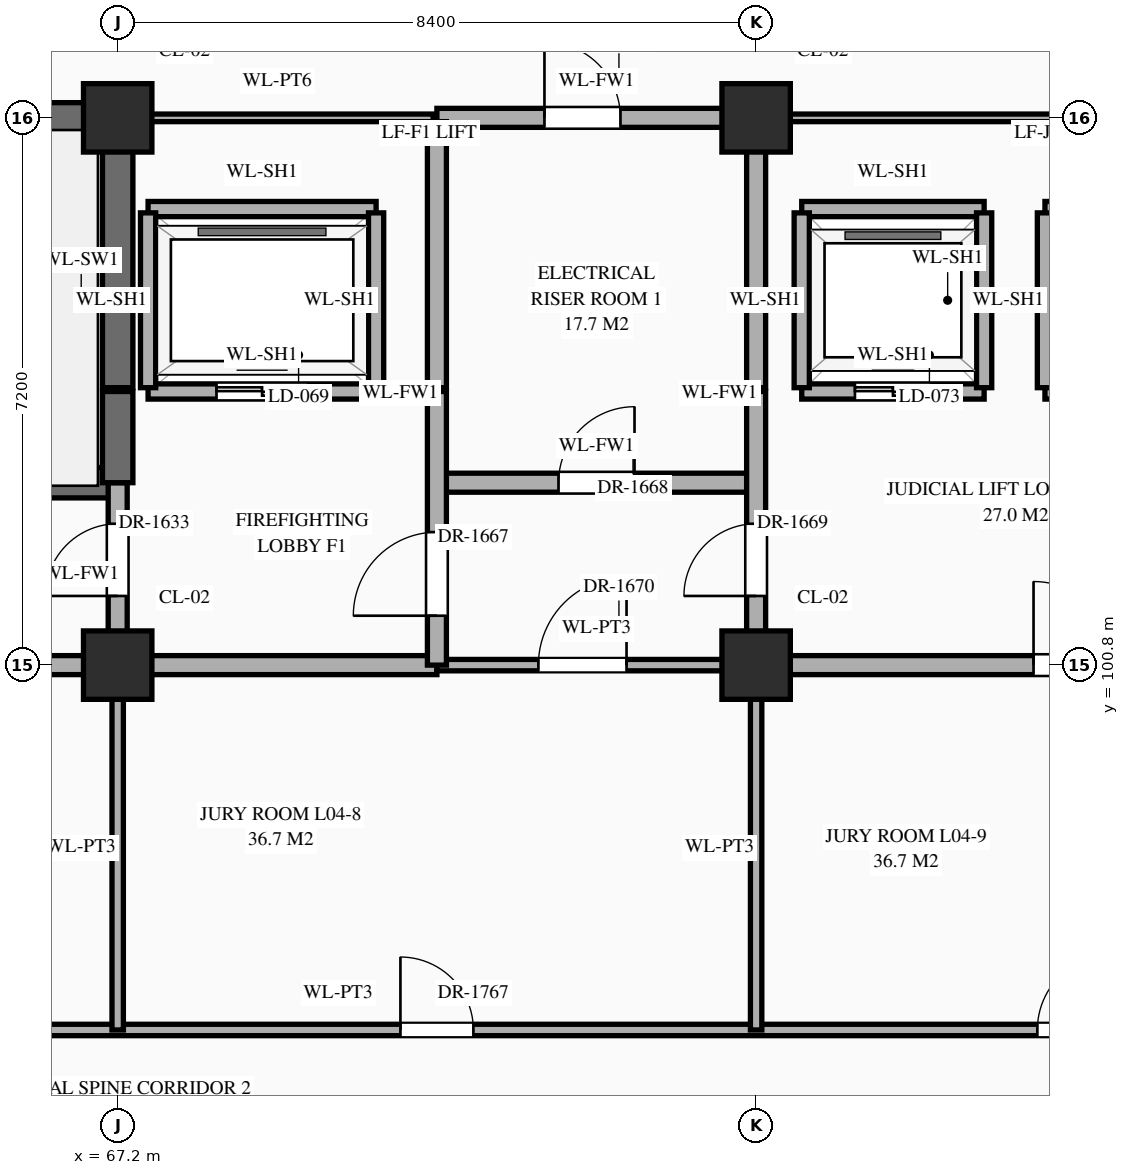
"""IFC4 building model, lengths in metres.
Left out: names, types, materials, properties, quantities, classifications, styles, units other than length and angle.
Written with IfcOpenShell. Run it as: python <this file> out.ifc"""

import sys

from ifc_helpers import new_model, si_unit, direction, frame, frame_2d, origin, origin_2d, place, context, subcontext, project, spatial, rectangle, extrude, element, fill, save


model = new_model("IFC4")
c1 = context("Model", 3, precision=1e-05, world=origin(), true_north=direction((0.0, 1.0)))
c2 = subcontext(c1, "Body", "Model", "MODEL_VIEW")
j1 = project(units=[si_unit("LENGTHUNIT", "METRE"), si_unit("PLANEANGLEUNIT", "RADIAN")], contexts=[c1])
p1 = place(None, origin())
s1 = spatial("IfcSite", under=j1, at=p1, CompositionType="ELEMENT")
p2 = place(p1, origin())
s2 = spatial("IfcBuilding", under=s1, at=p2, CompositionType="ELEMENT")
p3 = place(p2, frame((0.0, 0.0, 16.2)))
s3 = spatial("IfcBuildingStorey", under=s2, at=p3, CompositionType="ELEMENT", Elevation=16.2)
for number, where, z_axis, x_axis in (
    (1, (67.2, 100.8, 0.0), (0.0, 0.0, 1.0), (1.0, 0.0, 0.0)),
    (2, (67.2, 108.0, 0.0), (0.0, 0.0, 1.0), (1.0, 0.0, 0.0)),
    (3, (75.6, 100.8, 0.0), (0.0, 0.0, 1.0), (1.0, 0.0, 0.0)),
    (4, (75.6, 108.0, 0.0), (0.0, 0.0, 1.0), (1.0, 0.0, 0.0)),
):
    element("IfcColumn", number, at=place(p3, frame(where, z_axis=z_axis, x_axis=x_axis)), inside=s3, PredefinedType="COLUMN", context=c2, shape_type="SweptSolid", body=[
        extrude(rectangle(XDim=0.9, YDim=0.9, at=origin_2d()), origin(), (0.0, 0.0, 1.0), 5.4),
    ])
p4 = place(p3, frame((56.2, 96.0, 0.0), z_axis=(0.0, 0.0, 1.0), x_axis=(1.0, 0.0, 0.0)))
e5 = element("IfcWall", 5, at=p4, inside=s3, PredefinedType="STANDARD", context=c2, shape_type="SweptSolid", body=[
    extrude(rectangle(XDim=27.8, YDim=0.15, at=frame_2d((13.9, 0.0))), origin(), (0.0, 0.0, 1.0), 5.12),
])
p5 = place(p4, frame((0.87, 0.0, 0.0)))
e6 = element("IfcOpeningElement", 6, at=p5, cuts=e5, PredefinedType="OPENING", context=c2, shape_type="SweptSolid", body=[
    extrude(rectangle(XDim=0.86, YDim=2.1, at=frame_2d((0.43, 1.05))), frame((0.0, 0.087, 0.0), z_axis=(0.0, -1.0, 0.0), x_axis=(1.0, 0.0, 0.0)), (0.0, 0.0, 1.0), 0.174),
])
p6 = place(p4, frame((6.34, 0.0, 0.0)))
e7 = element("IfcOpeningElement", 7, at=p6, cuts=e5, PredefinedType="OPENING", context=c2, shape_type="SweptSolid", body=[
    extrude(rectangle(XDim=0.92, YDim=2.15, at=frame_2d((0.46, 1.075))), frame((0.0, 0.087, 0.0), z_axis=(0.0, -1.0, 0.0), x_axis=(1.0, 0.0, 0.0)), (0.0, 0.0, 1.0), 0.174),
])
p7 = place(p4, frame((14.72, 0.0, 0.0)))
e8 = element("IfcOpeningElement", 8, at=p7, cuts=e5, PredefinedType="OPENING", context=c2, shape_type="SweptSolid", body=[
    extrude(rectangle(XDim=0.96, YDim=2.2, at=frame_2d((0.48, 1.1))), frame((0.0, 0.087, 0.0), z_axis=(0.0, -1.0, 0.0), x_axis=(1.0, 0.0, 0.0)), (0.0, 0.0, 1.0), 0.174),
])
p8 = place(p4, frame((23.1, 0.0, 0.0)))
e9 = element("IfcOpeningElement", 9, at=p8, cuts=e5, PredefinedType="OPENING", context=c2, shape_type="SweptSolid", body=[
    extrude(rectangle(XDim=1.0, YDim=2.25, at=frame_2d((0.5, 1.125))), frame((0.0, 0.087, 0.0), z_axis=(0.0, -1.0, 0.0), x_axis=(1.0, 0.0, 0.0)), (0.0, 0.0, 1.0), 0.174),
])
p9 = place(p3, frame((58.8, 100.8, 0.0), z_axis=(0.0, 0.0, 1.0), x_axis=(1.0, 0.0, 0.0)))
e10 = element("IfcWall", 10, at=p9, inside=s3, PredefinedType="STANDARD", context=c2, shape_type="SweptSolid", body=[
    extrude(rectangle(XDim=12.6, YDim=0.25, at=frame_2d((6.3, 0.0))), origin(), (0.0, 0.0, 1.0), 4.27),
])
p10 = place(p9, frame((3.7, 0.0, 0.0)))
e11 = element("IfcOpeningElement", 11, at=p10, cuts=e10, PredefinedType="OPENING", context=c2, shape_type="SweptSolid", body=[
    extrude(rectangle(XDim=1.0, YDim=2.2, at=frame_2d((0.5, 1.1))), frame((0.0, 0.137, 0.0), z_axis=(0.0, -1.0, 0.0), x_axis=(1.0, 0.0, 0.0)), (0.0, 0.0, 1.0), 0.274),
])
p11 = place(p3, frame((71.4, 100.8, 0.0), z_axis=(0.0, 0.0, 1.0), x_axis=(1.0, 0.0, 0.0)))
e12 = element("IfcWall", 12, at=p11, inside=s3, PredefinedType="STANDARD", context=c2, shape_type="SweptSolid", body=[
    extrude(rectangle(XDim=4.2, YDim=0.15, at=frame_2d((2.1, 0.0))), origin(), (0.0, 0.0, 1.0), 4.27),
])
p12 = place(p11, frame((1.335, 0.0, 0.0)))
e13 = element("IfcOpeningElement", 13, at=p12, cuts=e12, PredefinedType="OPENING", context=c2, shape_type="SweptSolid", body=[
    extrude(rectangle(XDim=1.16, YDim=2.3, at=frame_2d((0.58, 1.15))), frame((0.0, 0.087, 0.0), z_axis=(0.0, -1.0, 0.0), x_axis=(1.0, 0.0, 0.0)), (0.0, 0.0, 1.0), 0.174),
])
p13 = place(p3, frame((75.6, 100.8, 0.0), z_axis=(0.0, 0.0, 1.0), x_axis=(1.0, 0.0, 0.0)))
e14 = element("IfcWall", 14, at=p13, inside=s3, PredefinedType="STANDARD", context=c2, shape_type="SweptSolid", body=[
    extrude(rectangle(XDim=16.8, YDim=0.25, at=frame_2d((8.4, 0.0))), origin(), (0.0, 0.0, 1.0), 4.27),
])
p14 = place(p13, frame((3.65, 0.0, 0.0)))
e15 = element("IfcOpeningElement", 15, at=p14, cuts=e14, PredefinedType="OPENING", context=c2, shape_type="SweptSolid", body=[
    extrude(rectangle(XDim=1.1, YDim=2.2, at=frame_2d((0.55, 1.1))), frame((0.0, 0.137, 0.0), z_axis=(0.0, -1.0, 0.0), x_axis=(1.0, 0.0, 0.0)), (0.0, 0.0, 1.0), 0.274),
])
p15 = place(p13, frame((9.81, 0.0, 0.0)))
e16 = element("IfcOpeningElement", 16, at=p15, cuts=e14, PredefinedType="OPENING", context=c2, shape_type="SweptSolid", body=[
    extrude(rectangle(XDim=0.95, YDim=2.15, at=frame_2d((0.475, 1.075))), frame((0.0, 0.137, 0.0), z_axis=(0.0, -1.0, 0.0), x_axis=(1.0, 0.0, 0.0)), (0.0, 0.0, 1.0), 0.274),
])
p16 = place(p13, frame((12.45, 0.0, 0.0)))
e17 = element("IfcOpeningElement", 17, at=p16, cuts=e14, PredefinedType="OPENING", context=c2, shape_type="SweptSolid", body=[
    extrude(rectangle(XDim=1.1, YDim=2.2, at=frame_2d((0.55, 1.1))), frame((0.0, 0.137, 0.0), z_axis=(0.0, -1.0, 0.0), x_axis=(1.0, 0.0, 0.0)), (0.0, 0.0, 1.0), 0.274),
])
p17 = place(p13, frame((14.815, 0.0, 0.0)))
e18 = element("IfcOpeningElement", 18, at=p17, cuts=e14, PredefinedType="OPENING", context=c2, shape_type="SweptSolid", body=[
    extrude(rectangle(XDim=1.0, YDim=2.2, at=frame_2d((0.5, 1.1))), frame((0.0, 0.137, 0.0), z_axis=(0.0, -1.0, 0.0), x_axis=(1.0, 0.0, 0.0)), (0.0, 0.0, 1.0), 0.274),
])
p18 = place(p3, frame((58.8, 103.2, 0.0), z_axis=(0.0, 0.0, 1.0), x_axis=(1.0, 0.0, 0.0)))
e19 = element("IfcWall", 19, at=p18, inside=s3, PredefinedType="SHEAR", context=c2, shape_type="SweptSolid", body=[
    extrude(rectangle(XDim=8.4, YDim=0.4, at=frame_2d((4.2, 0.0))), origin(), (0.0, 0.0, 1.0), 5.12),
])
p19 = place(p18, frame((0.65, 0.0, 0.0)))
e20 = element("IfcOpeningElement", 20, at=p19, cuts=e19, PredefinedType="OPENING", context=c2, shape_type="SweptSolid", body=[
    extrude(rectangle(XDim=1.1, YDim=2.2, at=frame_2d((0.55, 1.1))), frame((0.0, 0.212, 0.0), z_axis=(0.0, -1.0, 0.0), x_axis=(1.0, 0.0, 0.0)), (0.0, 0.0, 1.0), 0.424),
])
p20 = place(p3, frame((71.4, 103.2, 0.0), z_axis=(0.0, 0.0, 1.0), x_axis=(1.0, 0.0, 0.0)))
e21 = element("IfcWall", 21, at=p20, inside=s3, PredefinedType="STANDARD", context=c2, shape_type="SweptSolid", body=[
    extrude(rectangle(XDim=4.2, YDim=0.25, at=frame_2d((2.1, 0.0))), origin(), (0.0, 0.0, 1.0), 5.12),
])
p21 = place(p20, frame((1.6, 0.0, 0.0)))
e22 = element("IfcOpeningElement", 22, at=p21, cuts=e21, PredefinedType="OPENING", context=c2, shape_type="SweptSolid", body=[
    extrude(rectangle(XDim=1.0, YDim=2.2, at=frame_2d((0.5, 1.1))), frame((0.0, 0.137, 0.0), z_axis=(0.0, -1.0, 0.0), x_axis=(1.0, 0.0, 0.0)), (0.0, 0.0, 1.0), 0.274),
])
p22 = place(p3, frame((67.6, 104.4, 0.0), z_axis=(0.0, 0.0, 1.0), x_axis=(1.0, 0.0, 0.0)))
e23 = element("IfcWall", 23, at=p22, inside=s3, PredefinedType="STANDARD", context=c2, shape_type="SweptSolid", body=[
    extrude(rectangle(XDim=3.0, YDim=0.2, at=frame_2d((1.5, 0.0))), origin(), (0.0, 0.0, 1.0), 5.12),
])
p23 = place(p22, frame((0.9, 0.0, 0.0)))
e24 = element("IfcOpeningElement", 24, at=p23, cuts=e23, PredefinedType="OPENING", context=c2, shape_type="SweptSolid", body=[
    extrude(rectangle(XDim=1.2, YDim=2.15, at=frame_2d((0.6, 1.075))), frame((0.0, 0.112, 0.0), z_axis=(0.0, -1.0, 0.0), x_axis=(1.0, 0.0, 0.0)), (0.0, 0.0, 1.0), 0.224),
])
p24 = place(p3, frame((76.2, 104.4, 0.0), z_axis=(0.0, 0.0, 1.0), x_axis=(1.0, 0.0, 0.0)))
e25 = element("IfcWall", 25, at=p24, inside=s3, PredefinedType="STANDARD", context=c2, shape_type="SweptSolid", body=[
    extrude(rectangle(XDim=2.4, YDim=0.2, at=frame_2d((1.2, 0.0))), origin(), (0.0, 0.0, 1.0), 5.12),
])
p25 = place(p24, frame((0.7, 0.0, 0.0)))
e26 = element("IfcOpeningElement", 26, at=p25, cuts=e25, PredefinedType="OPENING", context=c2, shape_type="SweptSolid", body=[
    extrude(rectangle(XDim=1.0, YDim=2.15, at=frame_2d((0.5, 1.075))), frame((0.0, 0.112, 0.0), z_axis=(0.0, -1.0, 0.0), x_axis=(1.0, 0.0, 0.0)), (0.0, 0.0, 1.0), 0.224),
])
p26 = place(p3, frame((79.4, 104.4, 0.0), z_axis=(0.0, 0.0, 1.0), x_axis=(1.0, 0.0, 0.0)))
e27 = element("IfcWall", 27, at=p26, inside=s3, PredefinedType="STANDARD", context=c2, shape_type="SweptSolid", body=[
    extrude(rectangle(XDim=2.4, YDim=0.2, at=frame_2d((1.2, 0.0))), origin(), (0.0, 0.0, 1.0), 5.12),
])
p27 = place(p26, frame((0.7, 0.0, 0.0)))
e28 = element("IfcOpeningElement", 28, at=p27, cuts=e27, PredefinedType="OPENING", context=c2, shape_type="SweptSolid", body=[
    extrude(rectangle(XDim=1.0, YDim=2.15, at=frame_2d((0.5, 1.075))), frame((0.0, 0.112, 0.0), z_axis=(0.0, -1.0, 0.0), x_axis=(1.0, 0.0, 0.0)), (0.0, 0.0, 1.0), 0.224),
])
p28 = place(p3, frame((67.6, 106.8, 0.0), z_axis=(0.0, 0.0, 1.0), x_axis=(1.0, 0.0, 0.0)))
e29 = element("IfcWall", 29, at=p28, inside=s3, PredefinedType="STANDARD", context=c2, shape_type="SweptSolid", body=[
    extrude(rectangle(XDim=3.0, YDim=0.2, at=frame_2d((1.5, 0.0))), origin(), (0.0, 0.0, 1.0), 5.12),
])
for number, where, z_axis, x_axis in (
    (30, (76.2, 106.8, 0.0), (0.0, 0.0, 1.0), (1.0, 0.0, 0.0)),
    (31, (79.4, 106.8, 0.0), (0.0, 0.0, 1.0), (1.0, 0.0, 0.0)),
):
    element("IfcWall", number, at=place(p3, frame(where, z_axis=z_axis, x_axis=x_axis)), inside=s3, PredefinedType="STANDARD", context=c2, shape_type="SweptSolid", body=[
        extrude(rectangle(XDim=2.4, YDim=0.2, at=frame_2d((1.2, 0.0))), origin(), (0.0, 0.0, 1.0), 5.12),
    ])
p29 = place(p3, frame((58.8, 108.0, 0.0), z_axis=(0.0, 0.0, 1.0), x_axis=(1.0, 0.0, 0.0)))
e32 = element("IfcWall", 32, at=p29, inside=s3, PredefinedType="SHEAR", context=c2, shape_type="SweptSolid", body=[
    extrude(rectangle(XDim=8.4, YDim=0.4, at=frame_2d((4.2, 0.0))), origin(), (0.0, 0.0, 1.0), 5.12),
])
p30 = place(p3, frame((67.25, 108.0, 0.0), z_axis=(0.0, 0.0, 1.0), x_axis=(1.0, 0.0, 0.0)))
e33 = element("IfcWall", 33, at=p30, inside=s3, PredefinedType="STANDARD", context=c2, shape_type="SweptSolid", body=[
    extrude(rectangle(XDim=4.1, YDim=0.1, at=frame_2d((2.05, 0.0))), origin(), (0.0, 0.0, 1.0), 4.27),
])
p31 = place(p3, frame((71.4, 108.0, 0.0), z_axis=(0.0, 0.0, 1.0), x_axis=(1.0, 0.0, 0.0)))
e34 = element("IfcWall", 34, at=p31, inside=s3, PredefinedType="STANDARD", context=c2, shape_type="SweptSolid", body=[
    extrude(rectangle(XDim=4.2, YDim=0.25, at=frame_2d((2.1, 0.0))), origin(), (0.0, 0.0, 1.0), 4.27),
])
p32 = place(p31, frame((1.415, 0.0, 0.0)))
e35 = element("IfcOpeningElement", 35, at=p32, cuts=e34, PredefinedType="OPENING", context=c2, shape_type="SweptSolid", body=[
    extrude(rectangle(XDim=1.0, YDim=2.2, at=frame_2d((0.5, 1.1))), frame((0.0, 0.137, 0.0), z_axis=(0.0, -1.0, 0.0), x_axis=(1.0, 0.0, 0.0)), (0.0, 0.0, 1.0), 0.274),
])
p33 = place(p3, frame((75.65, 108.0, 0.0), z_axis=(0.0, 0.0, 1.0), x_axis=(1.0, 0.0, 0.0)))
e36 = element("IfcWall", 36, at=p33, inside=s3, PredefinedType="STANDARD", context=c2, shape_type="SweptSolid", body=[
    extrude(rectangle(XDim=6.15, YDim=0.1, at=frame_2d((3.075, 0.0))), origin(), (0.0, 0.0, 1.0), 4.27),
])
p34 = place(p3, frame((67.2, 96.0, 0.0), z_axis=(0.0, 0.0, 1.0), x_axis=(0.0, 1.0, 0.0)))
e37 = element("IfcWall", 37, at=p34, inside=s3, PredefinedType="STANDARD", context=c2, shape_type="SweptSolid", body=[
    extrude(rectangle(XDim=4.8, YDim=0.15, at=frame_2d((2.4, 0.0))), origin(), (0.0, 0.0, 1.0), 4.37),
])
p35 = place(p3, frame((67.2, 100.8, 0.0), z_axis=(0.0, 0.0, 1.0), x_axis=(0.0, 1.0, 0.0)))
e38 = element("IfcWall", 38, at=p35, inside=s3, PredefinedType="STANDARD", context=c2, shape_type="SweptSolid", body=[
    extrude(rectangle(XDim=2.4, YDim=0.25, at=frame_2d((1.2, 0.0))), origin(), (0.0, 0.0, 1.0), 4.37),
])
p36 = place(p35, frame((0.91, 0.0, 0.0)))
e39 = element("IfcOpeningElement", 39, at=p36, cuts=e38, PredefinedType="OPENING", context=c2, shape_type="SweptSolid", body=[
    extrude(rectangle(XDim=0.95, YDim=2.15, at=frame_2d((0.475, 1.075))), frame((0.0, 0.137, 0.0), z_axis=(0.0, -1.0, 0.0), x_axis=(1.0, 0.0, 0.0)), (0.0, 0.0, 1.0), 0.274),
])
p37 = place(p3, frame((67.2, 103.2, 0.0), z_axis=(0.0, 0.0, 1.0), x_axis=(0.0, 1.0, 0.0)))
e40 = element("IfcWall", 40, at=p37, inside=s3, PredefinedType="SHEAR", context=c2, shape_type="SweptSolid", body=[
    extrude(rectangle(XDim=1.2, YDim=0.4, at=frame_2d((0.6, 0.0))), origin(), (0.0, 0.0, 1.0), 5.12),
])
p38 = place(p3, frame((67.2, 104.45, 0.0), z_axis=(0.0, 0.0, 1.0), x_axis=(0.0, 1.0, 0.0)))
e41 = element("IfcWall", 41, at=p38, inside=s3, PredefinedType="SHEAR", context=c2, shape_type="SweptSolid", body=[
    extrude(rectangle(XDim=3.5, YDim=0.4, at=frame_2d((1.75, 0.0))), origin(), (0.0, 0.0, 1.0), 5.12),
])
for number, where, z_axis, x_axis in (
    (42, (67.6, 104.45, 0.0), (0.0, 0.0, 1.0), (0.0, 1.0, 0.0)),
    (43, (70.6, 104.45, 0.0), (0.0, 0.0, 1.0), (0.0, 1.0, 0.0)),
):
    element("IfcWall", number, at=place(p3, frame(where, z_axis=z_axis, x_axis=x_axis)), inside=s3, PredefinedType="STANDARD", context=c2, shape_type="SweptSolid", body=[
        extrude(rectangle(XDim=2.3, YDim=0.2, at=frame_2d((1.15, 0.0))), origin(), (0.0, 0.0, 1.0), 5.12),
    ])
p39 = place(p3, frame((71.4, 100.8, 0.0), z_axis=(0.0, 0.0, 1.0), x_axis=(0.0, 1.0, 0.0)))
e44 = element("IfcWall", 44, at=p39, inside=s3, PredefinedType="STANDARD", context=c2, shape_type="SweptSolid", body=[
    extrude(rectangle(XDim=3.6, YDim=0.25, at=frame_2d((1.8, 0.0))), origin(), (0.0, 0.0, 1.0), 4.72),
])
p40 = place(p39, frame((0.65, 0.0, 0.0)))
e45 = element("IfcOpeningElement", 45, at=p40, cuts=e44, PredefinedType="OPENING", context=c2, shape_type="SweptSolid", body=[
    extrude(rectangle(XDim=1.1, YDim=2.2, at=frame_2d((0.55, 1.1))), frame((0.0, 0.137, 0.0), z_axis=(0.0, -1.0, 0.0), x_axis=(1.0, 0.0, 0.0)), (0.0, 0.0, 1.0), 0.274),
])
p41 = place(p3, frame((71.4, 104.45, 0.0), z_axis=(0.0, 0.0, 1.0), x_axis=(0.0, 1.0, 0.0)))
e46 = element("IfcWall", 46, at=p41, inside=s3, PredefinedType="STANDARD", context=c2, shape_type="SweptSolid", body=[
    extrude(rectangle(XDim=3.5, YDim=0.25, at=frame_2d((1.75, 0.0))), origin(), (0.0, 0.0, 1.0), 4.72),
])
p42 = place(p3, frame((75.6, 96.0, 0.0), z_axis=(0.0, 0.0, 1.0), x_axis=(0.0, 1.0, 0.0)))
e47 = element("IfcWall", 47, at=p42, inside=s3, PredefinedType="STANDARD", context=c2, shape_type="SweptSolid", body=[
    extrude(rectangle(XDim=4.8, YDim=0.15, at=frame_2d((2.4, 0.0))), origin(), (0.0, 0.0, 1.0), 4.37),
])
p43 = place(p3, frame((75.6, 100.8, 0.0), z_axis=(0.0, 0.0, 1.0), x_axis=(0.0, 1.0, 0.0)))
e48 = element("IfcWall", 48, at=p43, inside=s3, PredefinedType="STANDARD", context=c2, shape_type="SweptSolid", body=[
    extrude(rectangle(XDim=3.6, YDim=0.25, at=frame_2d((1.8, 0.0))), origin(), (0.0, 0.0, 1.0), 4.37),
])
p44 = place(p43, frame((0.91, 0.0, 0.0)))
e49 = element("IfcOpeningElement", 49, at=p44, cuts=e48, PredefinedType="OPENING", context=c2, shape_type="SweptSolid", body=[
    extrude(rectangle(XDim=0.95, YDim=2.15, at=frame_2d((0.475, 1.075))), frame((0.0, 0.137, 0.0), z_axis=(0.0, -1.0, 0.0), x_axis=(1.0, 0.0, 0.0)), (0.0, 0.0, 1.0), 0.274),
])
p45 = place(p3, frame((75.6, 104.45, 0.0), z_axis=(0.0, 0.0, 1.0), x_axis=(0.0, 1.0, 0.0)))
e50 = element("IfcWall", 50, at=p45, inside=s3, PredefinedType="STANDARD", context=c2, shape_type="SweptSolid", body=[
    extrude(rectangle(XDim=3.5, YDim=0.25, at=frame_2d((1.75, 0.0))), origin(), (0.0, 0.0, 1.0), 4.37),
])
for number, where, z_axis, x_axis in (
    (51, (76.2, 104.45, 0.0), (0.0, 0.0, 1.0), (0.0, 1.0, 0.0)),
    (52, (78.6, 104.45, 0.0), (0.0, 0.0, 1.0), (0.0, 1.0, 0.0)),
    (53, (79.4, 104.45, 0.0), (0.0, 0.0, 1.0), (0.0, 1.0, 0.0)),
):
    element("IfcWall", number, at=place(p3, frame(where, z_axis=z_axis, x_axis=x_axis)), inside=s3, PredefinedType="STANDARD", context=c2, shape_type="SweptSolid", body=[
        extrude(rectangle(XDim=2.3, YDim=0.2, at=frame_2d((1.15, 0.0))), origin(), (0.0, 0.0, 1.0), 5.12),
    ])
p46 = place(p23, origin())
e54 = element("IfcDoor", 54, at=p46, inside=s3, OperationType="DOUBLE_DOOR_SLIDING", PredefinedType="DOOR", context=c2, shape_type="SweptSolid", body=[
    extrude(rectangle(XDim=1.2, YDim=2.15, at=frame_2d((0.6, 1.075))), frame((0.0, 0.025, 0.0), z_axis=(0.0, -1.0, 0.0), x_axis=(1.0, 0.0, 0.0)), (0.0, 0.0, 1.0), 0.05),
])
fill(e24, e54)
p47 = place(p25, origin())
e55 = element("IfcDoor", 55, at=p47, inside=s3, OperationType="DOUBLE_DOOR_SLIDING", PredefinedType="DOOR", context=c2, shape_type="SweptSolid", body=[
    extrude(rectangle(XDim=1.0, YDim=2.15, at=frame_2d((0.5, 1.075))), frame((0.0, 0.025, 0.0), z_axis=(0.0, -1.0, 0.0), x_axis=(1.0, 0.0, 0.0)), (0.0, 0.0, 1.0), 0.05),
])
fill(e26, e55)
p48 = place(p36, origin())
e56 = element("IfcDoor", 56, at=p48, inside=s3, OperationType="SINGLE_SWING_LEFT", PredefinedType="DOOR", context=c2, shape_type="SweptSolid", body=[
    extrude(rectangle(XDim=0.95, YDim=2.15, at=frame_2d((0.475, 1.075))), frame((0.0, 0.025, 0.0), z_axis=(0.0, -1.0, 0.0), x_axis=(1.0, 0.0, 0.0)), (0.0, 0.0, 1.0), 0.05),
])
fill(e39, e56)
p49 = place(p40, origin())
e57 = element("IfcDoor", 57, at=p49, inside=s3, OperationType="SINGLE_SWING_LEFT", PredefinedType="DOOR", context=c2, shape_type="SweptSolid", body=[
    extrude(rectangle(XDim=1.1, YDim=2.2, at=frame_2d((0.55, 1.1))), frame((0.0, 0.025, 0.0), z_axis=(0.0, -1.0, 0.0), x_axis=(1.0, 0.0, 0.0)), (0.0, 0.0, 1.0), 0.05),
])
fill(e45, e57)
p50 = place(p21, origin())
e58 = element("IfcDoor", 58, at=p50, inside=s3, OperationType="SINGLE_SWING_RIGHT", PredefinedType="DOOR", context=c2, shape_type="SweptSolid", body=[
    extrude(rectangle(XDim=1.0, YDim=2.2, at=frame_2d((0.5, 1.1))), frame((0.0, 0.025, 0.0), z_axis=(0.0, -1.0, 0.0), x_axis=(1.0, 0.0, 0.0)), (0.0, 0.0, 1.0), 0.05),
])
fill(e22, e58)
p51 = place(p44, origin())
e59 = element("IfcDoor", 59, at=p51, inside=s3, OperationType="SINGLE_SWING_LEFT", PredefinedType="DOOR", context=c2, shape_type="SweptSolid", body=[
    extrude(rectangle(XDim=0.95, YDim=2.15, at=frame_2d((0.475, 1.075))), frame((0.0, 0.025, 0.0), z_axis=(0.0, -1.0, 0.0), x_axis=(1.0, 0.0, 0.0)), (0.0, 0.0, 1.0), 0.05),
])
fill(e49, e59)
p52 = place(p12, origin())
e60 = element("IfcDoor", 60, at=p52, inside=s3, OperationType="SINGLE_SWING_RIGHT", PredefinedType="DOOR", context=c2, shape_type="SweptSolid", body=[
    extrude(rectangle(XDim=1.16, YDim=2.3, at=frame_2d((0.58, 1.15))), frame((0.0, 0.025, 0.0), z_axis=(0.0, -1.0, 0.0), x_axis=(1.0, 0.0, 0.0)), (0.0, 0.0, 1.0), 0.05),
])
fill(e13, e60)
p53 = place(p32, origin())
e61 = element("IfcDoor", 61, at=p53, inside=s3, OperationType="SINGLE_SWING_LEFT", PredefinedType="DOOR", context=c2, shape_type="SweptSolid", body=[
    extrude(rectangle(XDim=1.0, YDim=2.2, at=frame_2d((0.5, 1.1))), frame((0.0, 0.025, 0.0), z_axis=(0.0, -1.0, 0.0), x_axis=(1.0, 0.0, 0.0)), (0.0, 0.0, 1.0), 0.05),
])
fill(e35, e61)
p54 = place(p14, origin())
e62 = element("IfcDoor", 62, at=p54, inside=s3, OperationType="SINGLE_SWING_LEFT", PredefinedType="DOOR", context=c2, shape_type="SweptSolid", body=[
    extrude(rectangle(XDim=1.1, YDim=2.2, at=frame_2d((0.55, 1.1))), frame((0.0, 0.025, 0.0), z_axis=(0.0, -1.0, 0.0), x_axis=(1.0, 0.0, 0.0)), (0.0, 0.0, 1.0), 0.05),
])
fill(e15, e62)
p55 = place(p7, origin())
e63 = element("IfcDoor", 63, at=p55, inside=s3, OperationType="SINGLE_SWING_LEFT", PredefinedType="DOOR", context=c2, shape_type="SweptSolid", body=[
    extrude(rectangle(XDim=0.96, YDim=2.2, at=frame_2d((0.48, 1.1))), frame((0.0, 0.025, 0.0), z_axis=(0.0, -1.0, 0.0), x_axis=(1.0, 0.0, 0.0)), (0.0, 0.0, 1.0), 0.05),
])
fill(e8, e63)
p56 = place(p8, origin())
e64 = element("IfcDoor", 64, at=p56, inside=s3, OperationType="SINGLE_SWING_RIGHT", PredefinedType="DOOR", context=c2, shape_type="SweptSolid", body=[
    extrude(rectangle(XDim=1.0, YDim=2.25, at=frame_2d((0.5, 1.125))), frame((0.0, 0.025, 0.0), z_axis=(0.0, -1.0, 0.0), x_axis=(1.0, 0.0, 0.0)), (0.0, 0.0, 1.0), 0.05),
])
fill(e9, e64)
save(model, sys.argv[1])
